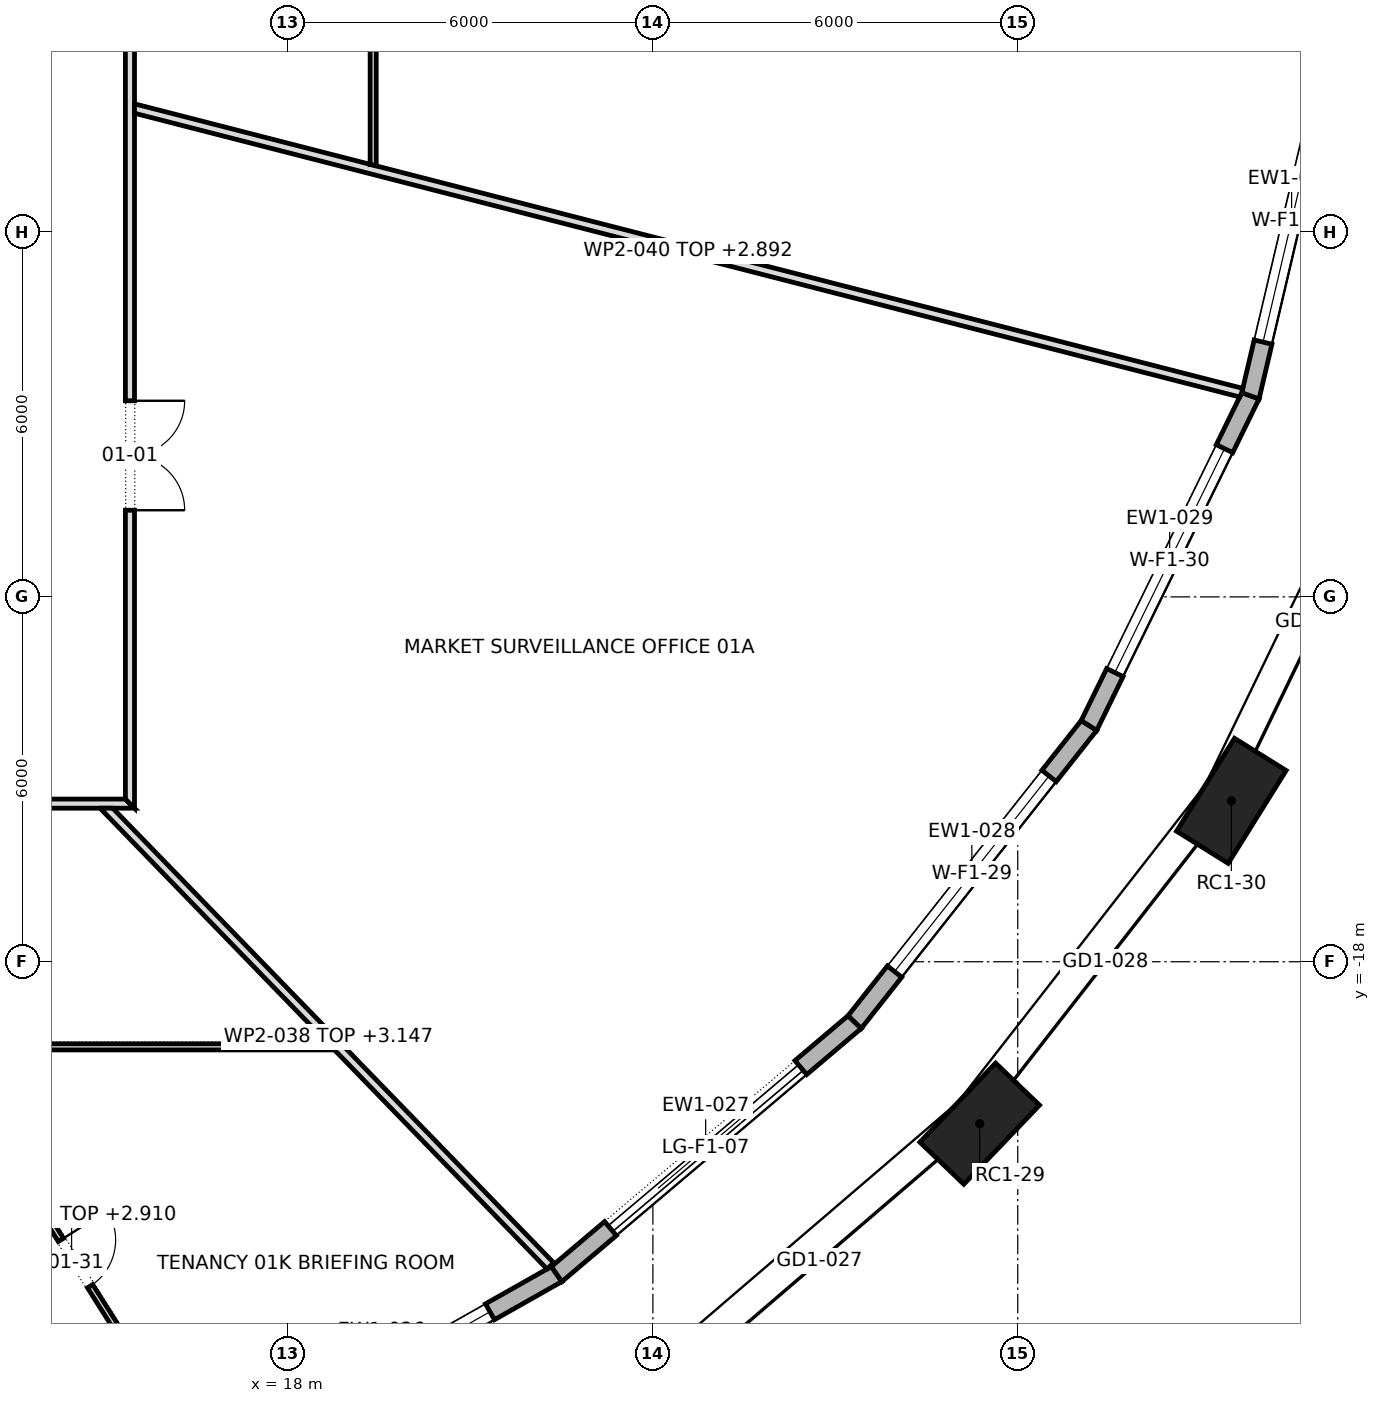
"""IFC4 building model, lengths in metres.
Left out: names, types, materials, properties, quantities, classifications, styles, units other than length and angle.
Written with IfcOpenShell. Run it as: python <this file> out.ifc"""

import sys

from ifc_helpers import new_model, si_unit, direction, frame, frame_2d, origin, origin_2d, place, context, subcontext, project, spatial, polyline, rectangle, outline, extrude, element, fill, save


model = new_model("IFC4")
c1 = context("Model", 3, precision=1e-05, world=origin(), true_north=direction((0.0, 1.0)))
c2 = subcontext(c1, "Body", "Model", "MODEL_VIEW")
j1 = project(units=[si_unit("LENGTHUNIT", "METRE"), si_unit("PLANEANGLEUNIT", "RADIAN")], contexts=[c1])
p1 = place(None, origin())
s1 = spatial("IfcSite", under=j1, at=p1, CompositionType="ELEMENT")
p2 = place(p1, origin())
s2 = spatial("IfcBuilding", under=s1, at=p2, CompositionType="ELEMENT")
p3 = place(p2, frame((0.0, 0.0, 27.7)))
s3 = spatial("IfcBuildingStorey", under=s2, at=p3, CompositionType="ELEMENT", Elevation=27.7)
for number, where, z_axis, x_axis in (
    (1, (29.375, -20.663, 0.0), (0.0, 0.0, 1.0), (0.692, 0.722, 0.0)),
    (2, (33.513, -15.354, 0.0), (0.0, 0.0, 1.0), (0.529, 0.849, 0.0)),
):
    element("IfcColumn", number, at=place(p3, frame(where, z_axis=z_axis, x_axis=x_axis)), inside=s3, PredefinedType="COLUMN", context=c2, shape_type="SweptSolid", body=[
        extrude(rectangle(XDim=1.8, YDim=1.0, at=origin_2d()), origin(), (0.0, 0.0, 1.0), 4.2),
    ])
p4 = place(p3, frame((16.656, -26.393, 0.0), z_axis=(0.0, 0.0, 1.0), x_axis=(0.8705786416, 0.492029296678, 0.0)))
e3 = element("IfcWall", 3, at=p4, inside=s3, PredefinedType="STANDARD", context=c2, shape_type="SweptSolid", body=[
    extrude(outline(polyline([(-0.013, -0.15), (6.632, -0.15), (6.604, 0.15), (0.013, 0.15), (-0.013, -0.15)])), origin(), (0.0, 0.0, 1.0), 3.9),
])
p5 = place(p4, frame((1.259, 0.0, 0.6)))
e4 = element("IfcOpeningElement", 4, at=p5, cuts=e3, PredefinedType="OPENING", context=c2, shape_type="SweptSolid", body=[
    extrude(rectangle(XDim=4.1, YDim=2.85, at=frame_2d((2.05, 1.425))), frame((0.0, 0.162, 0.0), z_axis=(0.0, -1.0, 0.0), x_axis=(1.0, 0.0, 0.0)), (0.0, 0.0, 1.0), 0.324),
])
p6 = place(p3, frame((22.417, -23.137, 0.0), z_axis=(0.0, 0.0, 1.0), x_axis=(0.763540615407, 0.645759807223, 0.0)))
e5 = element("IfcWall", 5, at=p6, inside=s3, PredefinedType="STANDARD", context=c2, shape_type="SweptSolid", body=[
    extrude(outline(polyline([(-0.014, -0.15), (6.435, -0.15), (6.405, 0.15), (0.014, 0.15), (-0.014, -0.15)])), origin(), (0.0, 0.0, 1.0), 3.9),
])
p7 = place(p6, frame((1.16, 0.0, 0.0)))
e6 = element("IfcOpeningElement", 6, at=p7, cuts=e5, PredefinedType="OPENING", context=c2, shape_type="SweptSolid", body=[
    extrude(rectangle(XDim=4.1, YDim=3.45, at=frame_2d((2.05, 1.725))), frame((0.0, 0.162, 0.0), z_axis=(0.0, -1.0, 0.0), x_axis=(1.0, 0.0, 0.0)), (0.0, 0.0, 1.0), 0.324),
])
p8 = place(p3, frame((27.318, -18.992, 0.0), z_axis=(0.0, 0.0, 1.0), x_axis=(0.619902786528, 0.784678619089, 0.0)))
e7 = element("IfcWall", 7, at=p8, inside=s3, PredefinedType="STANDARD", context=c2, shape_type="SweptSolid", body=[
    extrude(outline(polyline([(-0.015, -0.15), (6.232, -0.15), (6.199, 0.15), (0.015, 0.15), (-0.015, -0.15)])), origin(), (0.0, 0.0, 1.0), 3.9),
])
p9 = place(p8, frame((1.058, 0.0, 0.6)))
e8 = element("IfcOpeningElement", 8, at=p9, cuts=e7, PredefinedType="OPENING", context=c2, shape_type="SweptSolid", body=[
    extrude(rectangle(XDim=4.1, YDim=2.85, at=frame_2d((2.05, 1.425))), frame((0.0, 0.162, 0.0), z_axis=(0.0, -1.0, 0.0), x_axis=(1.0, 0.0, 0.0)), (0.0, 0.0, 1.0), 0.324),
])
p10 = place(p3, frame((31.171, -14.115, 0.0), z_axis=(0.0, 0.0, 1.0), x_axis=(0.439821516427, 0.898085204025, 0.0)))
e9 = element("IfcWall", 9, at=p10, inside=s3, PredefinedType="STANDARD", context=c2, shape_type="SweptSolid", body=[
    extrude(outline(polyline([(-0.016, -0.15), (6.053, -0.15), (6.02, 0.15), (0.016, 0.15), (-0.016, -0.15)])), origin(), (0.0, 0.0, 1.0), 3.9),
])
p11 = place(p10, frame((0.969, 0.0, 0.6)))
e10 = element("IfcOpeningElement", 10, at=p11, cuts=e9, PredefinedType="OPENING", context=c2, shape_type="SweptSolid", body=[
    extrude(rectangle(XDim=4.1, YDim=2.85, at=frame_2d((2.05, 1.425))), frame((0.0, 0.162, 0.0), z_axis=(0.0, -1.0, 0.0), x_axis=(1.0, 0.0, 0.0)), (0.0, 0.0, 1.0), 0.324),
])
p12 = place(p3, frame((33.826, -8.693, 0.0), z_axis=(0.0, 0.0, 1.0), x_axis=(0.228924296831, 0.973444228665, 0.0)))
e11 = element("IfcWall", 11, at=p12, inside=s3, PredefinedType="STANDARD", context=c2, shape_type="SweptSolid", body=[
    extrude(outline(polyline([(-0.017, -0.15), (5.932, -0.15), (5.897, 0.15), (0.017, 0.15), (-0.017, -0.15)])), origin(), (0.0, 0.0, 1.0), 3.9),
])
p13 = place(p12, frame((0.907, 0.0, 0.6)))
e12 = element("IfcOpeningElement", 12, at=p13, cuts=e11, PredefinedType="OPENING", context=c2, shape_type="SweptSolid", body=[
    extrude(rectangle(XDim=4.1, YDim=2.85, at=frame_2d((2.05, 1.425))), frame((0.0, 0.162, 0.0), z_axis=(0.0, -1.0, 0.0), x_axis=(1.0, 0.0, 0.0)), (0.0, 0.0, 1.0), 0.324),
])
p14 = place(p3, frame((-6.894, -19.4, 0.0), z_axis=(0.0, 0.0, 1.0), x_axis=(1.0, 0.0, 0.0)))
e13 = element("IfcWall", 13, at=p14, inside=s3, PredefinedType="PARTITIONING", context=c2, shape_type="SweptSolid", body=[
    extrude(outline(polyline([(0.0, -0.05), (1.526, -0.05), (3.052, -0.05), (4.578, -0.05), (4.578, -0.049), (4.587, -0.05), (6.454, -0.05), (8.321, -0.05), (10.188, -0.05), (12.055, -0.05), (13.922, -0.05), (13.925, -0.049), (13.925, -0.05), (15.696, -0.05), (17.468, -0.05), (19.239, -0.05), (19.243, -0.047), (19.245, -0.05), (20.848, -0.05), (22.451, -0.05), (24.054, -0.05), (25.657, -0.05), (25.657, -0.05), (25.614, -0.005), (25.614, -0.005), (25.561, 0.05), (23.819, 0.05), (22.076, 0.05), (20.334, 0.05), (18.591, 0.05), (16.849, 0.05), (15.106, 0.05), (13.364, 0.05), (13.364, 0.05), (13.264, 0.05), (13.264, 0.05), (11.781, 0.05), (10.297, 0.05), (8.814, 0.05), (8.814, 0.05), (8.714, 0.05), (8.714, 0.05), (6.978, 0.05), (5.243, 0.05), (3.507, 0.05), (1.771, 0.05), (0.036, 0.05), (0.0, -0.049), (0.0, -0.05)])), origin(), (0.0, 0.0, 1.0), 3.9),
])
p15 = place(p14, frame((6.249, 0.0, 0.0)))
e14 = element("IfcOpeningElement", 14, at=p15, cuts=e13, PredefinedType="OPENING", context=c2, shape_type="SweptSolid", body=[
    extrude(rectangle(XDim=0.9, YDim=2.1, at=frame_2d((0.45, 1.05))), frame((0.0, 0.062, 0.0), z_axis=(0.0, -1.0, 0.0), x_axis=(1.0, 0.0, 0.0)), (0.0, 0.0, 1.0), 0.124),
])
p16 = place(p14, frame((1.834, 0.0, 0.0)))
e15 = element("IfcOpeningElement", 15, at=p16, cuts=e13, PredefinedType="OPENING", context=c2, shape_type="SweptSolid", body=[
    extrude(rectangle(XDim=0.9, YDim=2.1, at=frame_2d((0.45, 1.05))), frame((0.0, 0.062, 0.0), z_axis=(0.0, -1.0, 0.0), x_axis=(1.0, 0.0, 0.0)), (0.0, 0.0, 1.0), 0.124),
])
p17 = place(p3, frame((1.87, -15.4, 0.0), z_axis=(0.0, 0.0, 1.0), x_axis=(1.0, 0.0, 0.0)))
e16 = element("IfcWall", 16, at=p17, inside=s3, PredefinedType="PARTITIONING", context=c2, shape_type="SweptSolid", body=[
    extrude(outline(polyline([(0.0, -0.075), (1.944, -0.075), (3.887, -0.075), (5.831, -0.075), (7.774, -0.075), (9.718, -0.075), (11.661, -0.075), (13.605, -0.075), (13.455, 0.075), (11.533, 0.075), (9.611, 0.075), (7.688, 0.075), (5.766, 0.075), (3.844, 0.075), (1.922, 0.075), (0.0, 0.075), (0.0, -0.075)])), origin(), (0.0, 0.0, 1.0), 3.9),
])
p18 = place(p17, frame((1.775, 0.0, 0.0)))
e17 = element("IfcOpeningElement", 17, at=p18, cuts=e16, PredefinedType="OPENING", context=c2, shape_type="SweptSolid", body=[
    extrude(rectangle(XDim=1.0, YDim=2.1, at=frame_2d((0.5, 1.05))), frame((0.0, 0.087, 0.0), z_axis=(0.0, -1.0, 0.0), x_axis=(1.0, 0.0, 0.0)), (0.0, 0.0, 1.0), 0.174),
])
p19 = place(p17, frame((8.31, 0.0, 0.0)))
e18 = element("IfcOpeningElement", 18, at=p19, cuts=e16, PredefinedType="OPENING", context=c2, shape_type="SweptSolid", body=[
    extrude(rectangle(XDim=1.0, YDim=2.1, at=frame_2d((0.5, 1.05))), frame((0.0, 0.087, 0.0), z_axis=(0.0, -1.0, 0.0), x_axis=(1.0, 0.0, 0.0)), (0.0, 0.0, 1.0), 0.174),
])
p20 = place(p3, frame((12.275, -19.424, 0.0), z_axis=(0.0, 0.0, 1.0), x_axis=(0.533945273126, -0.845519038997, 0.0)))
e19 = element("IfcWall", 19, at=p20, inside=s3, PredefinedType="PARTITIONING", context=c2, shape_type="SweptSolid", body=[
    extrude(outline(polyline([(0.0, -0.05), (1.614, -0.05), (3.228, -0.05), (4.842, -0.05), (6.456, -0.05), (8.071, -0.05), (8.083, 0.003), (8.085, 0.05), (8.085, 0.05), (6.48, 0.05), (4.876, 0.05), (3.272, 0.05), (1.667, 0.05), (0.063, 0.05), (0.0, -0.05), (0.0, -0.05)])), origin(), (0.0, 0.0, 1.0), 2.91),
])
p21 = place(p20, frame((3.727, 0.0, 0.0)))
e20 = element("IfcOpeningElement", 20, at=p21, cuts=e19, PredefinedType="OPENING", context=c2, shape_type="SweptSolid", body=[
    extrude(rectangle(XDim=0.9, YDim=2.1, at=frame_2d((0.45, 1.05))), frame((0.0, 0.062, 0.0), z_axis=(0.0, -1.0, 0.0), x_axis=(1.0, 0.0, 0.0)), (0.0, 0.0, 1.0), 0.124),
])
p22 = place(p3, frame((14.962, -15.423, 0.0), z_axis=(0.0, 0.0, 1.0), x_axis=(0.69624947088, -0.717799884578, 0.0)))
e21 = element("IfcWall", 21, at=p22, inside=s3, PredefinedType="PARTITIONING", context=c2, shape_type="SweptSolid", body=[
    extrude(outline(polyline([(0.0, -0.075), (1.799, -0.075), (3.599, -0.075), (5.398, -0.075), (5.465, -0.006), (5.537, -0.075), (7.21, -0.075), (8.884, -0.075), (10.558, -0.075), (10.558, -0.073), (10.558, 0.075), (8.823, 0.075), (7.087, 0.075), (5.352, 0.075), (3.616, 0.075), (1.881, 0.075), (0.145, 0.075), (0.0, -0.074), (0.0, -0.075)])), origin(), (0.0, 0.0, 1.0), 3.147),
])
p23 = place(p3, frame((15.4, -15.475, 0.0), z_axis=(0.0, 0.0, 1.0), x_axis=(0.0, 1.0, 0.0)))
e22 = element("IfcWall", 22, at=p23, inside=s3, PredefinedType="PARTITIONING", context=c2, shape_type="SweptSolid", body=[
    extrude(outline(polyline([(26.165, 0.075), (24.307, 0.075), (22.449, 0.075), (20.59, 0.075), (18.732, 0.075), (16.874, 0.075), (15.016, 0.075), (13.158, 0.075), (11.299, 0.075), (9.441, 0.075), (7.583, 0.075), (5.725, 0.075), (3.866, 0.075), (2.008, 0.075), (0.15, 0.075), (0.0, -0.075), (1.869, -0.075), (3.738, -0.075), (5.607, -0.075), (7.476, -0.075), (9.345, -0.075), (11.214, -0.075), (13.083, -0.075), (14.952, -0.075), (16.821, -0.075), (18.689, -0.075), (20.558, -0.075), (22.427, -0.075), (24.296, -0.075), (26.165, -0.075), (26.165, 0.075)])), origin(), (0.0, 0.0, 1.0), 3.9),
])
p24 = place(p23, frame((4.9, 0.0, 0.0)))
e23 = element("IfcOpeningElement", 23, at=p24, cuts=e22, PredefinedType="OPENING", context=c2, shape_type="SweptSolid", body=[
    extrude(rectangle(XDim=1.8, YDim=2.1, at=frame_2d((0.9, 1.05))), frame((0.0, 0.087, 0.0), z_axis=(0.0, -1.0, 0.0), x_axis=(1.0, 0.0, 0.0)), (0.0, 0.0, 1.0), 0.174),
])
p25 = place(p23, frame((14.975, 0.0, 0.0)))
e24 = element("IfcOpeningElement", 24, at=p25, cuts=e22, PredefinedType="OPENING", context=c2, shape_type="SweptSolid", body=[
    extrude(rectangle(XDim=1.0, YDim=2.1, at=frame_2d((0.5, 1.05))), frame((0.0, 0.087, 0.0), z_axis=(0.0, -1.0, 0.0), x_axis=(1.0, 0.0, 0.0)), (0.0, 0.0, 1.0), 0.174),
])
p26 = place(p23, frame((22.295, 0.0, 0.0)))
e25 = element("IfcOpeningElement", 25, at=p26, cuts=e22, PredefinedType="OPENING", context=c2, shape_type="SweptSolid", body=[
    extrude(rectangle(XDim=1.0, YDim=2.1, at=frame_2d((0.5, 1.05))), frame((0.0, 0.087, 0.0), z_axis=(0.0, -1.0, 0.0), x_axis=(1.0, 0.0, 0.0)), (0.0, 0.0, 1.0), 0.174),
])
p27 = place(p3, frame((15.457, -3.965, 0.0), z_axis=(0.0, 0.0, 1.0), x_axis=(0.968588981289, -0.248667218036, 0.0)))
e26 = element("IfcWall", 26, at=p27, inside=s3, PredefinedType="PARTITIONING", context=c2, shape_type="SweptSolid", body=[
    extrude(outline(polyline([(0.038, -0.075), (1.915, -0.075), (3.791, -0.075), (5.667, -0.075), (7.544, -0.075), (9.42, -0.075), (11.297, -0.075), (13.173, -0.075), (15.049, -0.075), (16.926, -0.075), (18.802, -0.075), (18.816, -0.008), (18.816, 0.075), (16.965, 0.075), (15.113, 0.075), (13.261, 0.075), (11.41, 0.075), (9.558, 0.075), (7.707, 0.075), (5.855, 0.075), (4.003, 0.075), (4.0, 0.074), (4.0, 0.075), (2.667, 0.075), (1.333, 0.075), (0.0, 0.075), (0.0, 0.073), (0.038, -0.075)])), origin(), (0.0, 0.0, 1.0), 2.892),
])
p28 = place(p3, frame((19.4, -4.912, 0.0), z_axis=(0.0, 0.0, 1.0), x_axis=(0.0, 1.0, 0.0)))
e27 = element("IfcWall", 27, at=p28, inside=s3, PredefinedType="PARTITIONING", context=c2, shape_type="SweptSolid", body=[
    extrude(outline(polyline([(9.824, -0.05), (9.824, -0.049), (9.799, 0.05), (7.844, 0.05), (5.889, 0.05), (3.935, 0.05), (1.98, 0.05), (0.026, 0.05), (0.0, -0.049), (0.0, -0.05), (1.965, -0.05), (3.93, -0.05), (5.895, -0.05), (7.859, -0.05), (9.824, -0.05)])), origin(), (0.0, 0.0, 1.0), 3.9),
])
p29 = place(p28, frame((2.782, 0.0, 0.0)))
e28 = element("IfcOpeningElement", 28, at=p29, cuts=e27, PredefinedType="OPENING", context=c2, shape_type="SweptSolid", body=[
    extrude(rectangle(XDim=0.9, YDim=2.1, at=frame_2d((0.45, 1.05))), frame((0.0, 0.062, 0.0), z_axis=(0.0, -1.0, 0.0), x_axis=(1.0, 0.0, 0.0)), (0.0, 0.0, 1.0), 0.124),
])
p30 = place(p5, origin())
e29 = element("IfcWindow", 29, at=p30, inside=s3, PartitioningType="TRIPLE_PANEL_VERTICAL", PredefinedType="WINDOW", context=c2, shape_type="SweptSolid", body=[
    extrude(rectangle(XDim=4.1, YDim=2.85, at=frame_2d((2.05, 1.425))), frame((0.0, 0.03, 0.0), z_axis=(0.0, -1.0, 0.0), x_axis=(1.0, 0.0, 0.0)), (0.0, 0.0, 1.0), 0.06),
])
fill(e4, e29)
p31 = place(p7, origin())
e30 = element("IfcDoor", 30, at=p31, inside=s3, OperationType="DOUBLE_DOOR_SLIDING", PredefinedType="DOOR", context=c2, shape_type="SweptSolid", body=[
    extrude(rectangle(XDim=4.1, YDim=3.45, at=frame_2d((2.05, 1.725))), frame((0.0, 0.025, 0.0), z_axis=(0.0, -1.0, 0.0), x_axis=(1.0, 0.0, 0.0)), (0.0, 0.0, 1.0), 0.05),
])
fill(e6, e30)
p32 = place(p9, origin())
e31 = element("IfcWindow", 31, at=p32, inside=s3, PartitioningType="TRIPLE_PANEL_VERTICAL", PredefinedType="WINDOW", context=c2, shape_type="SweptSolid", body=[
    extrude(rectangle(XDim=4.1, YDim=2.85, at=frame_2d((2.05, 1.425))), frame((0.0, 0.03, 0.0), z_axis=(0.0, -1.0, 0.0), x_axis=(1.0, 0.0, 0.0)), (0.0, 0.0, 1.0), 0.06),
])
fill(e8, e31)
p33 = place(p11, origin())
e32 = element("IfcWindow", 32, at=p33, inside=s3, PartitioningType="TRIPLE_PANEL_VERTICAL", PredefinedType="WINDOW", context=c2, shape_type="SweptSolid", body=[
    extrude(rectangle(XDim=4.1, YDim=2.85, at=frame_2d((2.05, 1.425))), frame((0.0, 0.03, 0.0), z_axis=(0.0, -1.0, 0.0), x_axis=(1.0, 0.0, 0.0)), (0.0, 0.0, 1.0), 0.06),
])
fill(e10, e32)
p34 = place(p13, origin())
e33 = element("IfcWindow", 33, at=p34, inside=s3, PartitioningType="TRIPLE_PANEL_VERTICAL", PredefinedType="WINDOW", context=c2, shape_type="SweptSolid", body=[
    extrude(rectangle(XDim=4.1, YDim=2.85, at=frame_2d((2.05, 1.425))), frame((0.0, 0.03, 0.0), z_axis=(0.0, -1.0, 0.0), x_axis=(1.0, 0.0, 0.0)), (0.0, 0.0, 1.0), 0.06),
])
fill(e12, e33)
p35 = place(p24, frame((1.8, 0.0, 0.0), z_axis=(0.0, 0.0, 1.0), x_axis=(-1.0, 0.0, 0.0)))
e34 = element("IfcDoor", 34, at=p35, inside=s3, OperationType="DOUBLE_DOOR_SINGLE_SWING", PredefinedType="DOOR", context=c2, shape_type="SweptSolid", body=[
    extrude(rectangle(XDim=1.8, YDim=2.1, at=frame_2d((0.9, 1.05))), frame((0.0, 0.025, 0.0), z_axis=(0.0, -1.0, 0.0), x_axis=(1.0, 0.0, 0.0)), (0.0, 0.0, 1.0), 0.05),
])
fill(e23, e34)
p36 = place(p21, origin())
e35 = element("IfcDoor", 35, at=p36, inside=s3, OperationType="SINGLE_SWING_RIGHT", PredefinedType="DOOR", context=c2, shape_type="SweptSolid", body=[
    extrude(rectangle(XDim=0.9, YDim=2.1, at=frame_2d((0.45, 1.05))), frame((0.0, 0.025, 0.0), z_axis=(0.0, -1.0, 0.0), x_axis=(1.0, 0.0, 0.0)), (0.0, 0.0, 1.0), 0.05),
])
fill(e20, e35)
save(model, sys.argv[1])
